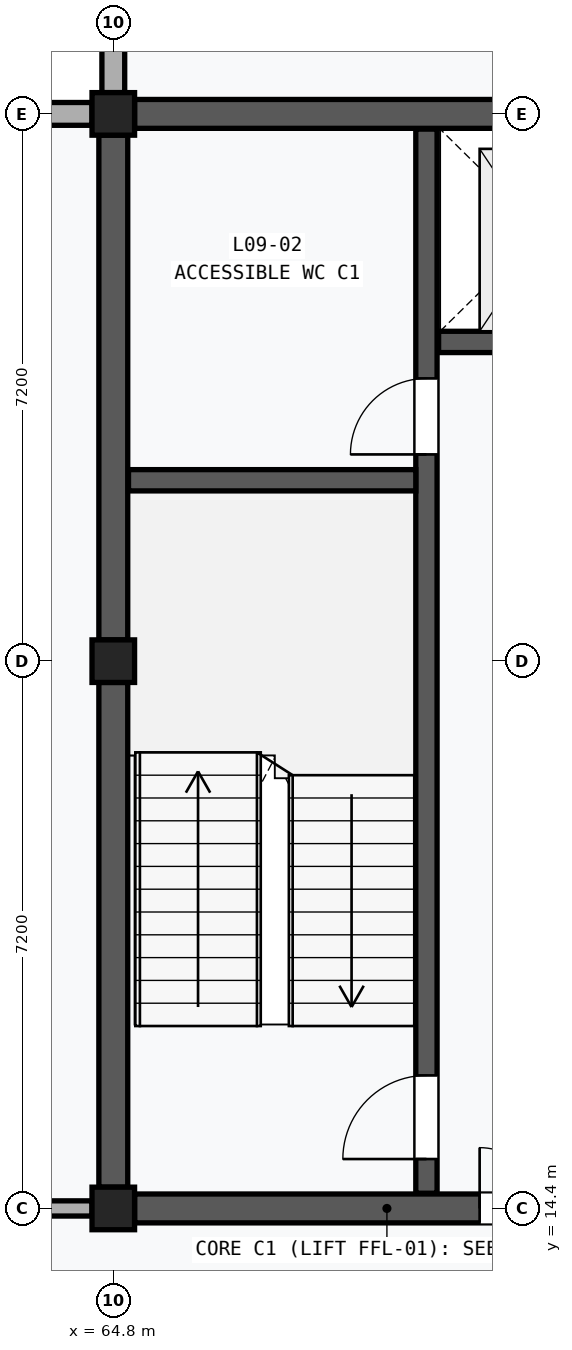
"""IFC4 building model, lengths in metres.
Left out: names, types, materials, properties, quantities, classifications, styles, units other than length and angle.
Written with IfcOpenShell. Run it as: python <this file> out.ifc"""

import sys

from ifc_helpers import new_model, si_unit, direction, frame, frame_2d, origin, origin_2d, place, context, subcontext, project, spatial, rectangle, extrude, element, fill, save


model = new_model("IFC4")
c1 = context("Model", 3, precision=1e-05, world=origin(), true_north=direction((0.0, 1.0)))
c2 = subcontext(c1, "Body", "Model", "MODEL_VIEW")
j1 = project(units=[si_unit("LENGTHUNIT", "METRE"), si_unit("PLANEANGLEUNIT", "RADIAN")], contexts=[c1])
p1 = place(None, origin())
s1 = spatial("IfcSite", under=j1, at=p1, CompositionType="ELEMENT")
p2 = place(p1, origin())
s2 = spatial("IfcBuilding", under=s1, at=p2, CompositionType="ELEMENT")
p3 = place(p2, frame((0.0, 0.0, 38.8)))
s3 = spatial("IfcBuildingStorey", under=s2, at=p3, CompositionType="ELEMENT", Elevation=38.8)
for number, where, z_axis, x_axis in (
    (1, (64.8, 14.4, 0.0), (0.0, 0.0, 1.0), (1.0, 0.0, 0.0)),
    (2, (64.8, 21.6, 0.0), (0.0, 0.0, 1.0), (1.0, 0.0, 0.0)),
    (3, (64.8, 28.8, 0.0), (0.0, 0.0, 1.0), (1.0, 0.0, 0.0)),
):
    element("IfcColumn", number, at=place(p3, frame(where, z_axis=z_axis, x_axis=x_axis)), inside=s3, PredefinedType="COLUMN", context=c2, shape_type="SweptSolid", body=[
        extrude(rectangle(XDim=0.56, YDim=0.56, at=origin_2d()), origin(), (0.0, 0.0, 1.0), 4.0),
    ])
p4 = place(p3, frame((57.78, 28.8, 0.0), z_axis=(0.0, 0.0, 1.0), x_axis=(1.0, 0.0, 0.0)))
e4 = element("IfcWall", 4, at=p4, inside=s3, PredefinedType="SOLIDWALL", context=c2, shape_type="SweptSolid", body=[
    extrude(rectangle(XDim=6.74, YDim=0.3, at=frame_2d((3.37, 0.0))), origin(), (0.0, 0.0, 1.0), 3.17),
])
p5 = place(p4, frame((2.42, 0.0, 1.1)))
e5 = element("IfcOpeningElement", 5, at=p5, cuts=e4, PredefinedType="OPENING", context=c2, shape_type="SweptSolid", body=[
    extrude(rectangle(XDim=1.9, YDim=1.5, at=frame_2d((0.95, 0.75))), frame((0.0, 0.162, 0.0), z_axis=(0.0, -1.0, 0.0), x_axis=(1.0, 0.0, 0.0)), (0.0, 0.0, 1.0), 0.324),
])
p6 = place(p3, frame((64.8, 29.08, 0.0), z_axis=(0.0, 0.0, 1.0), x_axis=(0.0, 1.0, 0.0)))
e6 = element("IfcWall", 6, at=p6, inside=s3, PredefinedType="SOLIDWALL", context=c2, shape_type="SweptSolid", body=[
    extrude(rectangle(XDim=6.64, YDim=0.3, at=frame_2d((3.32, 0.0))), origin(), (0.0, 0.0, 1.0), 3.17),
])
for number, where, z_axis, x_axis in (
    (7, (64.8, 14.68, 0.0), (0.0, 0.0, 1.0), (0.0, 1.0, 0.0)),
    (8, (64.8, 21.88, 0.0), (0.0, 0.0, 1.0), (0.0, 1.0, 0.0)),
):
    element("IfcWall", number, at=place(p3, frame(where, z_axis=z_axis, x_axis=x_axis)), inside=s3, PredefinedType="SHEAR", context=c2, shape_type="SweptSolid", body=[
        extrude(rectangle(XDim=6.64, YDim=0.38, at=frame_2d((3.32, 0.0))), origin(), (0.0, 0.0, 1.0), 3.01),
    ])
p7 = place(p3, frame((65.08, 14.4, 0.0), z_axis=(0.0, 0.0, 1.0), x_axis=(1.0, 0.0, 0.0)))
e9 = element("IfcWall", 9, at=p7, inside=s3, PredefinedType="SHEAR", context=c2, shape_type="SweptSolid", body=[
    extrude(rectangle(XDim=6.64, YDim=0.38, at=frame_2d((3.32, 0.0))), origin(), (0.0, 0.0, 1.0), 3.01),
])
p8 = place(p7, frame((4.54, 0.0, 0.0)))
e10 = element("IfcOpeningElement", 10, at=p8, cuts=e9, PredefinedType="OPENING", context=c2, shape_type="SweptSolid", body=[
    extrude(rectangle(XDim=1.6, YDim=2.2, at=frame_2d((0.8, 1.1))), frame((0.0, 0.202, 0.0), z_axis=(0.0, -1.0, 0.0), x_axis=(1.0, 0.0, 0.0)), (0.0, 0.0, 1.0), 0.404),
])
p9 = place(p3, frame((65.08, 28.8, 0.0), z_axis=(0.0, 0.0, 1.0), x_axis=(1.0, 0.0, 0.0)))
e11 = element("IfcWall", 11, at=p9, inside=s3, PredefinedType="SHEAR", context=c2, shape_type="SweptSolid", body=[
    extrude(rectangle(XDim=6.64, YDim=0.38, at=frame_2d((3.32, 0.0))), origin(), (0.0, 0.0, 1.0), 3.01),
])
p10 = place(p3, frame((68.92, 14.6, 0.0), z_axis=(0.0, 0.0, 1.0), x_axis=(0.0, 1.0, 0.0)))
e12 = element("IfcWall", 12, at=p10, inside=s3, PredefinedType="SHEAR", context=c2, shape_type="SweptSolid", body=[
    extrude(rectangle(XDim=14.0, YDim=0.28, at=frame_2d((7.0, 0.0))), origin(), (0.0, 0.0, 1.0), 3.74),
])
p11 = place(p10, frame((0.45, 0.0, 0.0)))
e13 = element("IfcOpeningElement", 13, at=p11, cuts=e12, PredefinedType="OPENING", context=c2, shape_type="SweptSolid", body=[
    extrude(rectangle(XDim=1.1, YDim=2.15, at=frame_2d((0.55, 1.075))), frame((0.0, 0.152, 0.0), z_axis=(0.0, -1.0, 0.0), x_axis=(1.0, 0.0, 0.0)), (0.0, 0.0, 1.0), 0.304),
])
p12 = place(p10, frame((9.72, 0.0, 0.0)))
e14 = element("IfcOpeningElement", 14, at=p12, cuts=e12, PredefinedType="OPENING", context=c2, shape_type="SweptSolid", body=[
    extrude(rectangle(XDim=1.0, YDim=2.15, at=frame_2d((0.5, 1.075))), frame((0.0, 0.152, 0.0), z_axis=(0.0, -1.0, 0.0), x_axis=(1.0, 0.0, 0.0)), (0.0, 0.0, 1.0), 0.304),
])
p13 = place(p3, frame((65.0, 23.98, 0.0), z_axis=(0.0, 0.0, 1.0), x_axis=(1.0, 0.0, 0.0)))
e15 = element("IfcWall", 15, at=p13, inside=s3, PredefinedType="SHEAR", context=c2, shape_type="SweptSolid", body=[
    extrude(rectangle(XDim=3.78, YDim=0.28, at=frame_2d((1.89, 0.0))), origin(), (0.0, 0.0, 1.0), 3.74),
])
p14 = place(p3, frame((69.08, 25.8, 0.0), z_axis=(0.0, 0.0, 1.0), x_axis=(1.0, 0.0, 0.0)))
e16 = element("IfcWall", 16, at=p14, inside=s3, PredefinedType="SHEAR", context=c2, shape_type="SweptSolid", body=[
    extrude(rectangle(XDim=2.68, YDim=0.28, at=frame_2d((1.34, 0.0))), origin(), (0.0, 0.0, 1.0), 3.74),
])
p15 = place(p14, frame((0.765, 0.0, 0.0)))
e17 = element("IfcOpeningElement", 17, at=p15, cuts=e16, PredefinedType="OPENING", context=c2, shape_type="SweptSolid", body=[
    extrude(rectangle(XDim=1.15, YDim=2.2, at=frame_2d((0.575, 1.1))), frame((0.0, 0.152, 0.0), z_axis=(0.0, -1.0, 0.0), x_axis=(1.0, 0.0, 0.0)), (0.0, 0.0, 1.0), 0.304),
])
p16 = place(p3, frame((57.88, 14.4, 0.0), z_axis=(0.0, 0.0, 1.0), x_axis=(1.0, 0.0, 0.0)))
e18 = element("IfcWall", 18, at=p16, inside=s3, PredefinedType="PARTITIONING", context=c2, shape_type="SweptSolid", body=[
    extrude(rectangle(XDim=6.64, YDim=0.2, at=frame_2d((3.32, 0.0))), origin(), (0.0, 0.0, 1.0), 3.01),
])
p17 = place(p16, frame((2.74, 0.0, 0.0)))
e19 = element("IfcOpeningElement", 19, at=p17, cuts=e18, PredefinedType="OPENING", context=c2, shape_type="SweptSolid", body=[
    extrude(rectangle(XDim=1.16, YDim=2.22, at=frame_2d((0.58, 1.11))), frame((0.0, 0.112, 0.0), z_axis=(0.0, -1.0, 0.0), x_axis=(1.0, 0.0, 0.0)), (0.0, 0.0, 1.0), 0.224),
])
p18 = place(p8, origin())
e20 = element("IfcDoor", 20, at=p18, inside=s3, OperationType="DOUBLE_DOOR_SINGLE_SWING", PredefinedType="DOOR", context=c2, shape_type="SweptSolid", body=[
    extrude(rectangle(XDim=1.6, YDim=2.2, at=frame_2d((0.8, 1.1))), frame((0.0, 0.025, 0.0), z_axis=(0.0, -1.0, 0.0), x_axis=(1.0, 0.0, 0.0)), (0.0, 0.0, 1.0), 0.05),
])
fill(e10, e20)
p19 = place(p11, origin())
e21 = element("IfcDoor", 21, at=p19, inside=s3, OperationType="SINGLE_SWING_LEFT", PredefinedType="DOOR", context=c2, shape_type="SweptSolid", body=[
    extrude(rectangle(XDim=1.1, YDim=2.15, at=frame_2d((0.55, 1.075))), frame((0.0, 0.025, 0.0), z_axis=(0.0, -1.0, 0.0), x_axis=(1.0, 0.0, 0.0)), (0.0, 0.0, 1.0), 0.05),
])
fill(e13, e21)
p20 = place(p12, origin())
e22 = element("IfcDoor", 22, at=p20, inside=s3, OperationType="SINGLE_SWING_LEFT", PredefinedType="DOOR", context=c2, shape_type="SweptSolid", body=[
    extrude(rectangle(XDim=1.0, YDim=2.15, at=frame_2d((0.5, 1.075))), frame((0.0, 0.025, 0.0), z_axis=(0.0, -1.0, 0.0), x_axis=(1.0, 0.0, 0.0)), (0.0, 0.0, 1.0), 0.05),
])
fill(e14, e22)
save(model, sys.argv[1])
